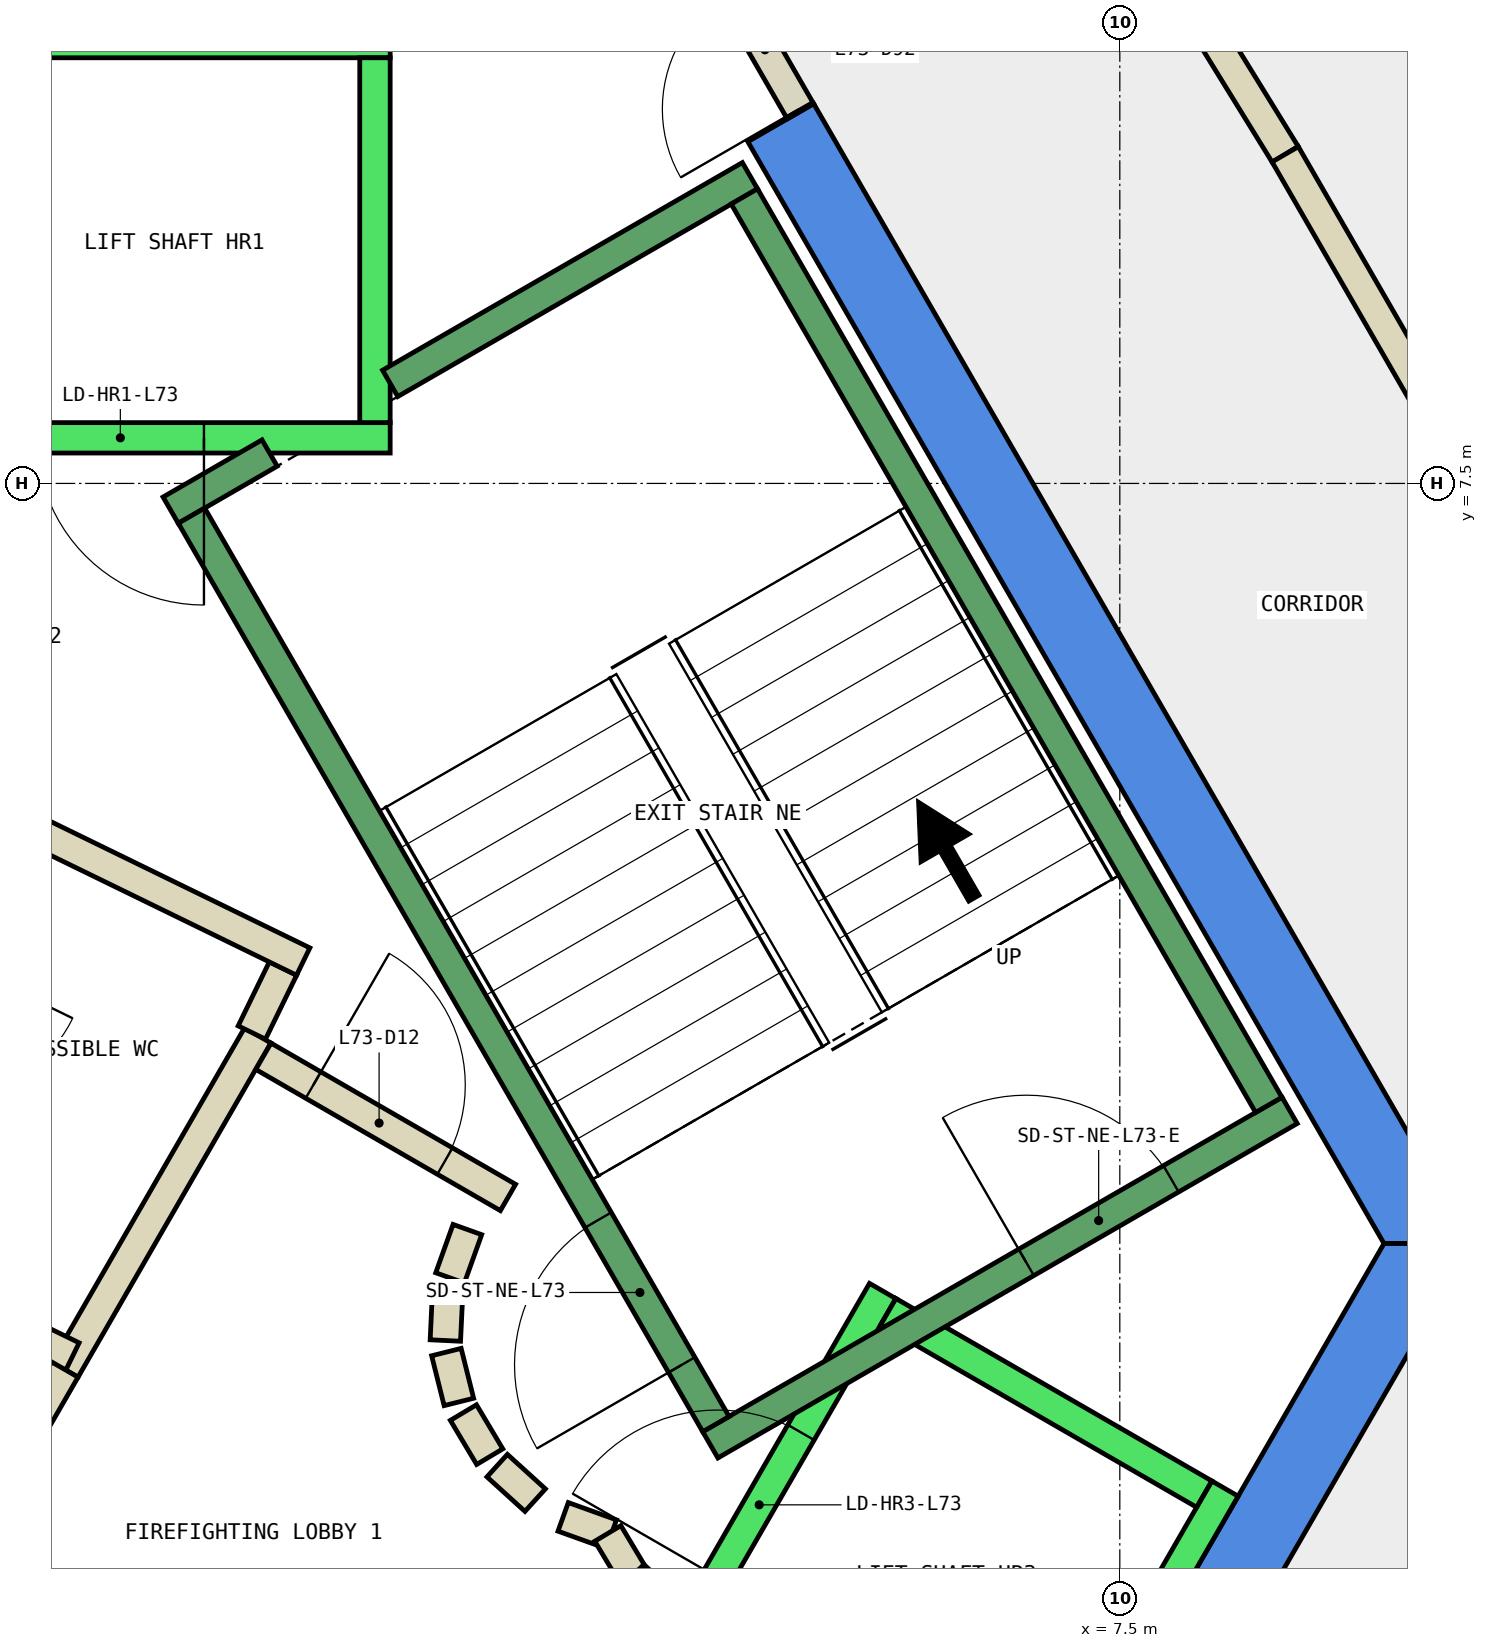
"""IFC4 building model, lengths in metres.
Left out: names, types, materials, properties, quantities, classifications, styles, units other than length and angle.
Written with IfcOpenShell. Run it as: python <this file> out.ifc"""

import sys

from ifc_helpers import new_model, si_unit, direction, frame, frame_2d, origin, place, context, subcontext, project, spatial, polyline, rectangle, outline, extrude, element, fill, save


model = new_model("IFC4")
c1 = context("Model", 3, precision=1e-05, world=origin(), true_north=direction((0.0, 1.0)))
c2 = subcontext(c1, "Body", "Model", "MODEL_VIEW")
j1 = project(units=[si_unit("LENGTHUNIT", "METRE"), si_unit("PLANEANGLEUNIT", "RADIAN")], contexts=[c1])
p1 = place(None, origin())
s1 = spatial("IfcSite", under=j1, at=p1, CompositionType="ELEMENT")
p2 = place(p1, origin())
s2 = spatial("IfcBuilding", under=s1, at=p2, CompositionType="ELEMENT")
p3 = place(p2, frame((0.0, 0.0, 311.6)))
s3 = spatial("IfcBuildingStorey", under=s2, at=p3, CompositionType="ELEMENT", Elevation=311.6)
p4 = place(p3, frame((0.0, 0.0, -0.34)))
e1 = element("IfcWall", 1, at=p4, inside=s3, PredefinedType="SHEAR", context=c2, shape_type="SweptSolid", body=[
    extrude(outline(polyline([(5.486, 9.998), (5.053, 9.748), (9.238, 2.5), (9.815, 2.5), (5.486, 9.998)])), origin(), (0.0, 0.0, 1.0), 3.6),
])
p5 = place(p3, frame((0.0, 0.0, -0.34)))
e2 = element("IfcWall", 2, at=p5, inside=s3, PredefinedType="SHEAR", context=c2, shape_type="SweptSolid", body=[
    extrude(outline(polyline([(4.907, -6.0), (9.815, 2.5), (9.238, 2.5), (4.619, -5.5), (4.907, -6.0)])), origin(), (0.0, 0.0, 1.0), 3.6),
])
p6 = place(p3, frame((0.56, 1.671, 0.0), z_axis=(0.0, 0.0, 1.0), x_axis=(0.500008334558, 0.866020591771, 0.0)))
e3 = element("IfcWall", 3, at=p6, inside=s3, PredefinedType="PARTITIONING", context=c2, shape_type="SweptSolid", body=[
    extrude(rectangle(XDim=2.538, YDim=0.2, at=frame_2d((1.269, 0.0))), origin(), (0.0, 0.0, 1.0), 3.26),
])
p7 = place(p3, frame((1.79, 3.888, 0.0), z_axis=(0.0, 0.0, 1.0), x_axis=(0.437807406823, 0.899068781869, 0.0)))
e4 = element("IfcWall", 4, at=p7, inside=s3, PredefinedType="PARTITIONING", context=c2, shape_type="SweptSolid", body=[
    extrude(rectangle(XDim=0.469, YDim=0.2, at=frame_2d((0.234, 0.0))), origin(), (0.0, 0.0, 1.0), 3.26),
])
p8 = place(p3, frame((2.128, 4.355, 0.0), z_axis=(0.0, 0.0, 1.0), x_axis=(-0.898876404494, 0.438202247191, 0.0)))
e5 = element("IfcWall", 5, at=p8, inside=s3, PredefinedType="PARTITIONING", context=c2, shape_type="SweptSolid", body=[
    extrude(rectangle(XDim=1.999, YDim=0.2, at=frame_2d((1.0, 0.0))), origin(), (0.0, 0.0, 1.0), 3.26),
])
p9 = place(p3, frame((-0.984, 2.535, 0.0), z_axis=(0.0, 0.0, 1.0), x_axis=(0.898707583217, -0.438548378025, 0.0)))
e6 = element("IfcWall", 6, at=p9, inside=s3, PredefinedType="PARTITIONING", context=c2, shape_type="SweptSolid", body=[
    extrude(rectangle(XDim=1.774, YDim=0.2, at=frame_2d((0.887, 0.0))), origin(), (0.0, 0.0, 1.0), 3.26),
])
p10 = place(p3, frame((4.454, 16.364, 0.0), z_axis=(0.0, 0.0, 1.0), x_axis=(0.525142215688, -0.851014484778, 0.0)))
e7 = element("IfcWall", 7, at=p10, inside=s3, PredefinedType="PARTITIONING", context=c2, shape_type="SweptSolid", body=[
    extrude(rectangle(XDim=7.872, YDim=0.2, at=frame_2d((3.936, 0.0))), origin(), (0.0, 0.0, 1.0), 3.26),
])
p11 = place(p3, frame((8.588, 9.665, 0.0), z_axis=(0.0, 0.0, 1.0), x_axis=(0.499946799636, -0.86605611685, 0.0)))
e8 = element("IfcWall", 8, at=p11, inside=s3, PredefinedType="PARTITIONING", context=c2, shape_type="SweptSolid", body=[
    extrude(rectangle(XDim=8.227, YDim=0.2, at=frame_2d((4.114, 0.0))), origin(), (0.0, 0.0, 1.0), 3.26),
])
p12 = place(p11, frame((3.613, 0.0, 0.0)))
e9 = element("IfcOpeningElement", 9, at=p12, cuts=e8, PredefinedType="OPENING", context=c2, shape_type="SweptSolid", body=[
    extrude(rectangle(XDim=1.0, YDim=2.1, at=frame_2d((0.5, 1.05))), frame((0.0, 0.11, 0.0), z_axis=(0.0, -1.0, 0.0), x_axis=(1.0, 0.0, 0.0)), (0.0, 0.0, 1.0), 0.22),
])
p13 = place(p3, frame((0.05, 0.787, 0.0), z_axis=(0.0, 0.0, 1.0), x_axis=(0.499819111317, 0.866129814729, 0.0)))
e10 = element("IfcWall", 10, at=p13, inside=s3, PredefinedType="PARTITIONING", context=c2, shape_type="SweptSolid", body=[
    extrude(rectangle(XDim=1.021, YDim=0.2, at=frame_2d((0.51, 0.0))), origin(), (0.0, 0.0, 1.0), 3.26),
])
p14 = place(p3, frame((1.866, 3.732, 0.0), z_axis=(0.0, 0.0, 1.0), x_axis=(0.866043361281, -0.499968895414, 0.0)))
e11 = element("IfcWall", 11, at=p14, inside=s3, PredefinedType="PARTITIONING", context=c2, shape_type="SweptSolid", body=[
    extrude(rectangle(XDim=1.858, YDim=0.2, at=frame_2d((0.929, 0.0))), origin(), (0.0, 0.0, 1.0), 3.26),
])
p15 = place(p14, frame((0.379, 0.0, 0.0)))
e12 = element("IfcOpeningElement", 12, at=p15, cuts=e11, PredefinedType="OPENING", context=c2, shape_type="SweptSolid", body=[
    extrude(rectangle(XDim=1.0, YDim=2.1, at=frame_2d((0.5, 1.05))), frame((0.0, 0.11, 0.0), z_axis=(0.0, -1.0, 0.0), x_axis=(1.0, 0.0, 0.0)), (0.0, 0.0, 1.0), 0.22),
])
p16 = place(p3, frame((3.208, 2.592, 0.0), z_axis=(0.0, 0.0, 1.0), x_axis=(-0.337388820924, -0.941365382578, 0.0)))
e13 = element("IfcWall", 13, at=p16, inside=s3, PredefinedType="PARTITIONING", context=c2, shape_type="SweptSolid", body=[
    extrude(rectangle(XDim=0.338, YDim=0.2, at=frame_2d((0.169, 0.0))), origin(), (0.0, 0.0, 1.0), 3.26),
])
p17 = place(p3, frame((3.079, 2.199, 0.0), z_axis=(0.0, 0.0, 1.0), x_axis=(-0.047771483479, -0.998858290933, 0.0)))
e14 = element("IfcWall", 14, at=p17, inside=s3, PredefinedType="PARTITIONING", context=c2, shape_type="SweptSolid", body=[
    extrude(rectangle(XDim=0.337, YDim=0.2, at=frame_2d((0.169, 0.0))), origin(), (0.0, 0.0, 1.0), 3.26),
])
p18 = place(p3, frame((3.07, 1.786, 0.0), z_axis=(0.0, 0.0, 1.0), x_axis=(0.242705583207, -0.970099994784, 0.0)))
e15 = element("IfcWall", 15, at=p18, inside=s3, PredefinedType="PARTITIONING", context=c2, shape_type="SweptSolid", body=[
    extrude(rectangle(XDim=0.338, YDim=0.2, at=frame_2d((0.169, 0.0))), origin(), (0.0, 0.0, 1.0), 3.26),
])
for number, where, z_axis, x_axis in (
    (16, (3.182, 1.388, 0.0), (0.0, 0.0, 1.0), (0.512, -0.859, 0.0)),
    (17, (3.404, 1.039, 0.0), (0.0, 0.0, 1.0), (0.74, -0.672, 0.0)),
):
    element("IfcWall", number, at=place(p3, frame(where, z_axis=z_axis, x_axis=x_axis)), inside=s3, PredefinedType="PARTITIONING", context=c2, shape_type="SweptSolid", body=[
        extrude(rectangle(XDim=0.338, YDim=0.2, at=frame_2d((0.169, 0.0))), origin(), (0.0, 0.0, 1.0), 3.26),
    ])
p19 = place(p3, frame((3.838, 0.702, 0.0), z_axis=(0.0, 0.0, 1.0), x_axis=(0.941035081519, -0.338308993895, 0.0)))
e18 = element("IfcWall", 18, at=p19, inside=s3, PredefinedType="PARTITIONING", context=c2, shape_type="SweptSolid", body=[
    extrude(rectangle(XDim=0.337, YDim=0.2, at=frame_2d((0.168, 0.0))), origin(), (0.0, 0.0, 1.0), 3.26),
])
p20 = place(p3, frame((4.132, 0.593, 0.0), z_axis=(0.0, 0.0, 1.0), x_axis=(0.513561617048, -0.858052717201, 0.0)))
e19 = element("IfcWall", 19, at=p20, inside=s3, PredefinedType="PARTITIONING", context=c2, shape_type="SweptSolid", body=[
    extrude(rectangle(XDim=0.308, YDim=0.2, at=frame_2d((0.154, 0.0))), origin(), (0.0, 0.0, 1.0), 3.26),
])
p21 = place(p3, frame((4.301, 0.315, 0.0), z_axis=(0.0, 0.0, 1.0), x_axis=(0.741798017506, -0.670623367639, 0.0)))
e20 = element("IfcWall", 20, at=p21, inside=s3, PredefinedType="PARTITIONING", context=c2, shape_type="SweptSolid", body=[
    extrude(rectangle(XDim=0.309, YDim=0.2, at=frame_2d((0.154, 0.0))), origin(), (0.0, 0.0, 1.0), 3.26),
])
p22 = place(p3, frame((5.399, 9.948, 0.0), z_axis=(0.0, 0.0, 1.0), x_axis=(-0.499882215713, 0.866093395895, 0.0)))
e21 = element("IfcWall", 21, at=p22, inside=s3, PredefinedType="PARTITIONING", context=c2, shape_type="SweptSolid", body=[
    extrude(rectangle(XDim=0.926, YDim=0.2, at=frame_2d((0.463, 0.0))), origin(), (0.0, 0.0, 1.0), 2.4),
])
p23 = place(p22, frame((0.017, 0.0, 0.0)))
e22 = element("IfcOpeningElement", 22, at=p23, cuts=e21, PredefinedType="OPENING", context=c2, shape_type="SweptSolid", body=[
    extrude(rectangle(XDim=0.9, YDim=2.1, at=frame_2d((0.45, 1.05))), frame((0.0, 0.11, 0.0), z_axis=(0.0, -1.0, 0.0), x_axis=(1.0, 0.0, 0.0)), (0.0, 0.0, 1.0), 0.22),
])
p24 = place(p3, frame((2.7, 7.8, 0.0), z_axis=(0.0, 0.0, 1.0), x_axis=(-1.0, 0.0, 0.0)))
e23 = element("IfcWall", 23, at=p24, inside=s3, PredefinedType="STANDARD", context=c2, shape_type="SweptSolid", body=[
    extrude(rectangle(XDim=5.4, YDim=0.2, at=frame_2d((2.7, 0.0))), origin(), (0.0, 0.0, 1.0), 3.26),
])
p25 = place(p24, frame((1.225, 0.0, 0.0)))
e24 = element("IfcOpeningElement", 24, at=p25, cuts=e23, PredefinedType="OPENING", context=c2, shape_type="SweptSolid", body=[
    extrude(rectangle(XDim=1.1, YDim=2.1, at=frame_2d((0.55, 1.05))), frame((0.0, 0.11, 0.0), z_axis=(0.0, -1.0, 0.0), x_axis=(1.0, 0.0, 0.0)), (0.0, 0.0, 1.0), 0.22),
])
p26 = place(p24, frame((3.075, 0.0, 0.0)))
e25 = element("IfcOpeningElement", 25, at=p26, cuts=e23, PredefinedType="OPENING", context=c2, shape_type="SweptSolid", body=[
    extrude(rectangle(XDim=1.1, YDim=2.1, at=frame_2d((0.55, 1.05))), frame((0.0, 0.11, 0.0), z_axis=(0.0, -1.0, 0.0), x_axis=(1.0, 0.0, 0.0)), (0.0, 0.0, 1.0), 0.22),
])
p27 = place(p3, frame((2.7, 10.4, 0.0), z_axis=(0.0, 0.0, 1.0), x_axis=(-1.0, 0.0, 0.0)))
e26 = element("IfcWall", 26, at=p27, inside=s3, PredefinedType="STANDARD", context=c2, shape_type="SweptSolid", body=[
    extrude(rectangle(XDim=5.4, YDim=0.2, at=frame_2d((2.7, 0.0))), origin(), (0.0, 0.0, 1.0), 3.26),
])
p28 = place(p3, frame((2.6, 7.9, 0.0), z_axis=(0.0, 0.0, 1.0), x_axis=(0.0, 1.0, 0.0)))
e27 = element("IfcWall", 27, at=p28, inside=s3, PredefinedType="STANDARD", context=c2, shape_type="SweptSolid", body=[
    extrude(rectangle(XDim=2.4, YDim=0.2, at=frame_2d((1.2, 0.0))), origin(), (0.0, 0.0, 1.0), 3.26),
])
p29 = place(p3, frame((3.24, -2.488, 0.0), z_axis=(0.0, 0.0, 1.0), x_axis=(0.500034260056, 0.866005622828, 0.0)))
e28 = element("IfcWall", 28, at=p29, inside=s3, PredefinedType="STANDARD", context=c2, shape_type="SweptSolid", body=[
    extrude(rectangle(XDim=5.399, YDim=0.2, at=frame_2d((2.7, 0.0))), origin(), (0.0, 0.0, 1.0), 3.26),
])
p30 = place(p29, frame((3.225, 0.0, 0.0)))
e29 = element("IfcOpeningElement", 29, at=p30, cuts=e28, PredefinedType="OPENING", context=c2, shape_type="SweptSolid", body=[
    extrude(rectangle(XDim=1.1, YDim=2.1, at=frame_2d((0.55, 1.05))), frame((0.0, 0.11, 0.0), z_axis=(0.0, -1.0, 0.0), x_axis=(1.0, 0.0, 0.0)), (0.0, 0.0, 1.0), 0.22),
])
p31 = place(p29, frame((1.225, 0.0, 0.0)))
e30 = element("IfcOpeningElement", 30, at=p31, cuts=e28, PredefinedType="OPENING", context=c2, shape_type="SweptSolid", body=[
    extrude(rectangle(XDim=1.1, YDim=2.1, at=frame_2d((0.55, 1.05))), frame((0.0, 0.11, 0.0), z_axis=(0.0, -1.0, 0.0), x_axis=(1.0, 0.0, 0.0)), (0.0, 0.0, 1.0), 0.22),
])
p32 = place(p3, frame((5.492, -3.788, 0.0), z_axis=(0.0, 0.0, 1.0), x_axis=(0.500034260056, 0.866005622828, 0.0)))
e31 = element("IfcWall", 31, at=p32, inside=s3, PredefinedType="STANDARD", context=c2, shape_type="SweptSolid", body=[
    extrude(rectangle(XDim=5.399, YDim=0.2, at=frame_2d((2.7, 0.0))), origin(), (0.0, 0.0, 1.0), 3.26),
])
p33 = place(p3, frame((5.977, 2.052, 0.0), z_axis=(0.0, 0.0, 1.0), x_axis=(0.865973769406, -0.500089422704, 0.0)))
e32 = element("IfcWall", 32, at=p33, inside=s3, PredefinedType="STANDARD", context=c2, shape_type="SweptSolid", body=[
    extrude(rectangle(XDim=2.399, YDim=0.2, at=frame_2d((1.2, 0.0))), origin(), (0.0, 0.0, 1.0), 3.26),
])
p34 = place(p3, frame((4.806, 1.176, 0.0), z_axis=(0.0, 0.0, 1.0), x_axis=(0.866059941101, 0.499940174841, 0.0)))
e33 = element("IfcWall", 33, at=p34, inside=s3, PredefinedType="STANDARD", context=c2, shape_type="SweptSolid", body=[
    extrude(rectangle(XDim=4.4, YDim=0.2, at=frame_2d((2.2, 0.0))), origin(), (0.0, 0.0, 1.0), 3.26),
])
p35 = place(p34, frame((2.4, 0.0, 0.0)))
e34 = element("IfcOpeningElement", 34, at=p35, cuts=e33, PredefinedType="OPENING", context=c2, shape_type="SweptSolid", body=[
    extrude(rectangle(XDim=1.1, YDim=2.2, at=frame_2d((0.55, 1.1))), frame((0.0, 0.11, 0.0), z_axis=(0.0, -1.0, 0.0), x_axis=(1.0, 0.0, 0.0)), (0.0, 0.0, 1.0), 0.22),
])
p36 = place(p3, frame((2.7, 8.158, 0.0), z_axis=(0.0, 0.0, 1.0), x_axis=(0.86611865017, 0.499838457731, 0.0)))
e35 = element("IfcWall", 35, at=p36, inside=s3, PredefinedType="STANDARD", context=c2, shape_type="SweptSolid", body=[
    extrude(rectangle(XDim=2.733, YDim=0.2, at=frame_2d((1.366, 0.0))), origin(), (0.0, 0.0, 1.0), 3.26),
])
p37 = place(p3, frame((1.256, 7.324, 0.0), z_axis=(0.0, 0.0, 1.0), x_axis=(0.865915093549, 0.500191014278, 0.0)))
e36 = element("IfcWall", 36, at=p37, inside=s3, PredefinedType="STANDARD", context=c2, shape_type="SweptSolid", body=[
    extrude(rectangle(XDim=0.752, YDim=0.2, at=frame_2d((0.376, 0.0))), origin(), (0.0, 0.0, 1.0), 3.26),
])
p38 = place(p3, frame((4.843, 1.312, 0.0), z_axis=(0.0, 0.0, 1.0), x_axis=(-0.499963383562, 0.866046543262, 0.0)))
e37 = element("IfcWall", 37, at=p38, inside=s3, PredefinedType="STANDARD", context=c2, shape_type="SweptSolid", body=[
    extrude(rectangle(XDim=6.9, YDim=0.2, at=frame_2d((3.45, 0.0))), origin(), (0.0, 0.0, 1.0), 3.26),
])
p39 = place(p38, frame((0.45, 0.0, 0.0)))
e38 = element("IfcOpeningElement", 38, at=p39, cuts=e37, PredefinedType="OPENING", context=c2, shape_type="SweptSolid", body=[
    extrude(rectangle(XDim=1.1, YDim=2.2, at=frame_2d((0.55, 1.1))), frame((0.0, 0.11, 0.0), z_axis=(0.0, -1.0, 0.0), x_axis=(1.0, 0.0, 0.0)), (0.0, 0.0, 1.0), 0.22),
])
p40 = place(p3, frame((8.48, 3.412, 0.0), z_axis=(0.0, 0.0, 1.0), x_axis=(-0.499978703459, 0.866037698999, 0.0)))
e39 = element("IfcWall", 39, at=p40, inside=s3, PredefinedType="STANDARD", context=c2, shape_type="SweptSolid", body=[
    extrude(rectangle(XDim=6.9, YDim=0.2, at=frame_2d((3.45, 0.0))), origin(), (0.0, 0.0, 1.0), 3.26),
])
p41 = place(p15, origin())
e40 = element("IfcDoor", 40, at=p41, inside=s3, OperationType="SINGLE_SWING_LEFT", PredefinedType="DOOR", context=c2, shape_type="SweptSolid", body=[
    extrude(rectangle(XDim=1.0, YDim=2.1, at=frame_2d((0.5, 1.05))), frame((0.0, 0.025, 0.0), z_axis=(0.0, -1.0, 0.0), x_axis=(1.0, 0.0, 0.0)), (0.0, 0.0, 1.0), 0.05),
])
fill(e12, e40)
p42 = place(p23, origin())
e41 = element("IfcDoor", 41, at=p42, inside=s3, OperationType="SINGLE_SWING_LEFT", PredefinedType="DOOR", context=c2, shape_type="SweptSolid", body=[
    extrude(rectangle(XDim=0.9, YDim=2.1, at=frame_2d((0.45, 1.05))), frame((0.0, 0.025, 0.0), z_axis=(0.0, -1.0, 0.0), x_axis=(1.0, 0.0, 0.0)), (0.0, 0.0, 1.0), 0.05),
])
fill(e22, e41)
p43 = place(p25, origin())
e42 = element("IfcDoor", 42, at=p43, inside=s3, OperationType="SLIDING_TO_LEFT", PredefinedType="DOOR", context=c2, shape_type="SweptSolid", body=[
    extrude(rectangle(XDim=1.1, YDim=2.1, at=frame_2d((0.55, 1.05))), frame((0.0, 0.025, 0.0), z_axis=(0.0, -1.0, 0.0), x_axis=(1.0, 0.0, 0.0)), (0.0, 0.0, 1.0), 0.05),
])
fill(e24, e42)
p44 = place(p30, origin())
e43 = element("IfcDoor", 43, at=p44, inside=s3, OperationType="SLIDING_TO_LEFT", PredefinedType="DOOR", context=c2, shape_type="SweptSolid", body=[
    extrude(rectangle(XDim=1.1, YDim=2.1, at=frame_2d((0.55, 1.05))), frame((0.0, 0.025, 0.0), z_axis=(0.0, -1.0, 0.0), x_axis=(1.0, 0.0, 0.0)), (0.0, 0.0, 1.0), 0.05),
])
fill(e29, e43)
p45 = place(p39, origin())
e44 = element("IfcDoor", 44, at=p45, inside=s3, OperationType="SINGLE_SWING_LEFT", PredefinedType="DOOR", context=c2, shape_type="SweptSolid", body=[
    extrude(rectangle(XDim=1.1, YDim=2.2, at=frame_2d((0.55, 1.1))), frame((0.0, 0.025, 0.0), z_axis=(0.0, -1.0, 0.0), x_axis=(1.0, 0.0, 0.0)), (0.0, 0.0, 1.0), 0.05),
])
fill(e38, e44)
p46 = place(p35, origin())
e45 = element("IfcDoor", 45, at=p46, inside=s3, OperationType="SINGLE_SWING_LEFT", PredefinedType="DOOR", context=c2, shape_type="SweptSolid", body=[
    extrude(rectangle(XDim=1.1, YDim=2.2, at=frame_2d((0.55, 1.1))), frame((0.0, 0.025, 0.0), z_axis=(0.0, -1.0, 0.0), x_axis=(1.0, 0.0, 0.0)), (0.0, 0.0, 1.0), 0.05),
])
fill(e34, e45)
save(model, sys.argv[1])
